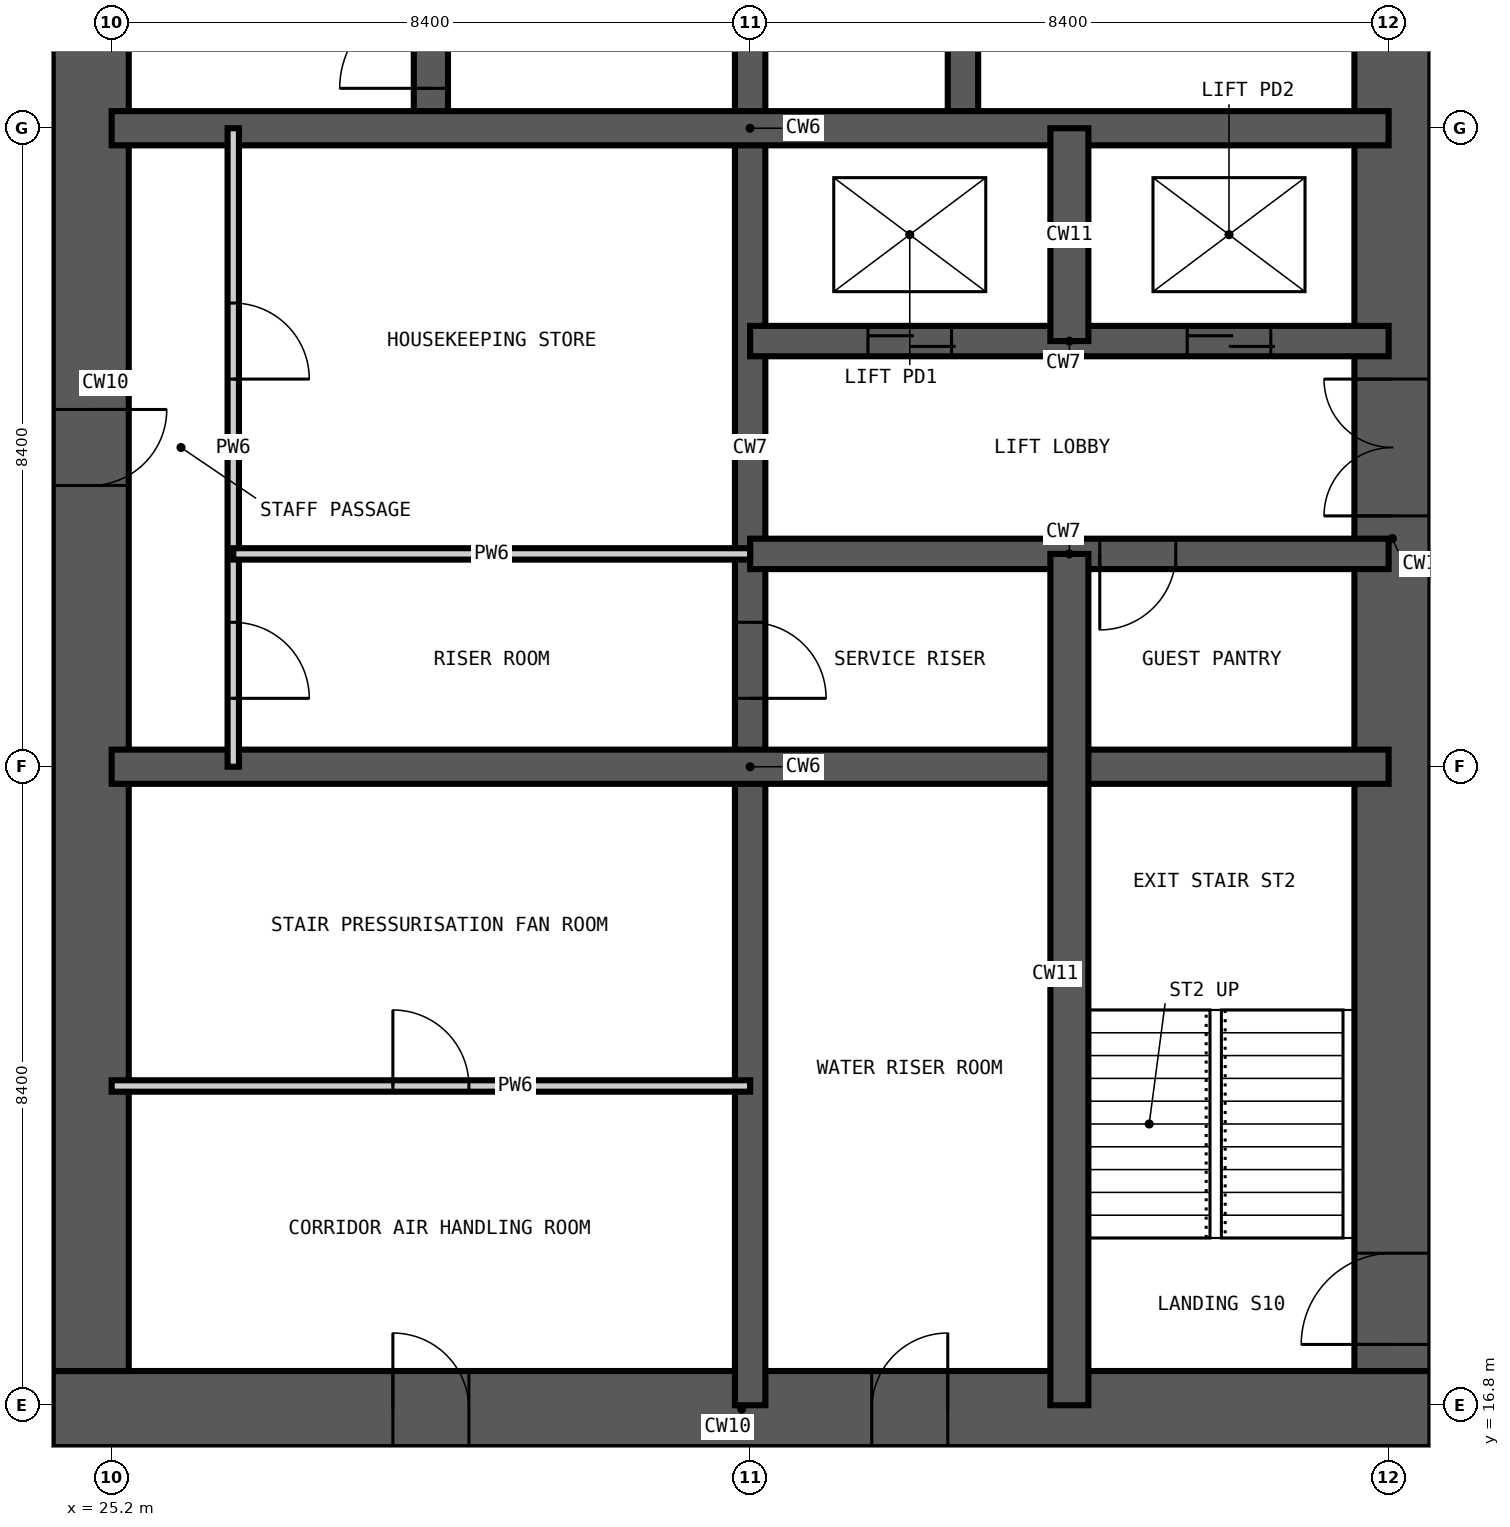
"""IFC4 building model, lengths in metres.
Left out: names, types, materials, properties, quantities, classifications, styles, units other than length and angle.
Written with IfcOpenShell. Run it as: python <this file> out.ifc"""

import sys

from ifc_helpers import new_model, si_unit, direction, frame, frame_2d, origin, place, context, subcontext, project, spatial, rectangle, extrude, element, fill, save


model = new_model("IFC4")
c1 = context("Model", 3, precision=1e-05, world=origin(), true_north=direction((0.0, 1.0)))
c2 = subcontext(c1, "Body", "Model", "MODEL_VIEW")
j1 = project(units=[si_unit("LENGTHUNIT", "METRE"), si_unit("PLANEANGLEUNIT", "RADIAN")], contexts=[c1])
p1 = place(None, origin())
s1 = spatial("IfcSite", under=j1, at=p1, CompositionType="ELEMENT")
p2 = place(p1, origin())
s2 = spatial("IfcBuilding", under=s1, at=p2, CompositionType="ELEMENT")
p3 = place(p2, frame((0.0, 0.0, 225.6)))
s3 = spatial("IfcBuildingStorey", under=s2, at=p3, CompositionType="ELEMENT", Elevation=225.6)
p4 = place(p3, frame((24.425, 16.75, -0.35), z_axis=(0.0, 0.0, 1.0), x_axis=(1.0, 0.0, 0.0)))
e1 = element("IfcWall", 1, at=p4, inside=s3, PredefinedType="SHEAR", context=c2, shape_type="SweptSolid", body=[
    extrude(rectangle(XDim=18.125, YDim=1.0, at=frame_2d((9.062, 0.0))), origin(), (0.0, 0.0, 1.0), 3.9),
])
p5 = place(p4, frame((4.475, 0.0, 0.35)))
e2 = element("IfcOpeningElement", 2, at=p5, cuts=e1, PredefinedType="OPENING", context=c2, shape_type="SweptSolid", body=[
    extrude(rectangle(XDim=1.0, YDim=2.1, at=frame_2d((0.5, 1.05))), frame((0.0, 0.51, 0.0), z_axis=(0.0, -1.0, 0.0), x_axis=(1.0, 0.0, 0.0)), (0.0, 0.0, 1.0), 1.02),
])
p6 = place(p4, frame((10.775, 0.0, 0.35)))
e3 = element("IfcOpeningElement", 3, at=p6, cuts=e1, PredefinedType="OPENING", context=c2, shape_type="SweptSolid", body=[
    extrude(rectangle(XDim=1.0, YDim=2.1, at=frame_2d((0.5, 1.05))), frame((0.0, 0.51, 0.0), z_axis=(0.0, -1.0, 0.0), x_axis=(1.0, 0.0, 0.0)), (0.0, 0.0, 1.0), 1.02),
])
p7 = place(p3, frame((42.05, 17.25, -0.35), z_axis=(0.0, 0.0, 1.0), x_axis=(0.0, 1.0, 0.0)))
e4 = element("IfcWall", 4, at=p7, inside=s3, PredefinedType="SHEAR", context=c2, shape_type="SweptSolid", body=[
    extrude(rectangle(XDim=24.3, YDim=1.0, at=frame_2d((12.15, 0.0))), origin(), (0.0, 0.0, 1.0), 3.9),
])
p8 = place(p7, frame((0.35, 0.0, 0.35)))
e5 = element("IfcOpeningElement", 5, at=p8, cuts=e4, PredefinedType="OPENING", context=c2, shape_type="SweptSolid", body=[
    extrude(rectangle(XDim=1.2, YDim=2.2, at=frame_2d((0.6, 1.1))), frame((0.0, 0.51, 0.0), z_axis=(0.0, -1.0, 0.0), x_axis=(1.0, 0.0, 0.0)), (0.0, 0.0, 1.0), 1.02),
])
p9 = place(p7, frame((11.25, 0.0, 0.35)))
e6 = element("IfcOpeningElement", 6, at=p9, cuts=e4, PredefinedType="OPENING", context=c2, shape_type="SweptSolid", body=[
    extrude(rectangle(XDim=1.8, YDim=2.2, at=frame_2d((0.9, 1.1))), frame((0.0, 0.51, 0.0), z_axis=(0.0, -1.0, 0.0), x_axis=(1.0, 0.0, 0.0)), (0.0, 0.0, 1.0), 1.02),
])
p10 = place(p7, frame((20.05, 0.0, 0.35)))
e7 = element("IfcOpeningElement", 7, at=p10, cuts=e4, PredefinedType="OPENING", context=c2, shape_type="SweptSolid", body=[
    extrude(rectangle(XDim=1.0, YDim=2.1, at=frame_2d((0.5, 1.05))), frame((0.0, 0.51, 0.0), z_axis=(0.0, -1.0, 0.0), x_axis=(1.0, 0.0, 0.0)), (0.0, 0.0, 1.0), 1.02),
])
p11 = place(p3, frame((24.925, 41.55, -0.35), z_axis=(0.0, 0.0, 1.0), x_axis=(0.0, -1.0, 0.0)))
e8 = element("IfcWall", 8, at=p11, inside=s3, PredefinedType="SHEAR", context=c2, shape_type="SweptSolid", body=[
    extrude(rectangle(XDim=24.3, YDim=1.0, at=frame_2d((12.15, 0.0))), origin(), (0.0, 0.0, 1.0), 3.9),
])
p12 = place(p11, frame((11.65, 0.0, 0.35)))
e9 = element("IfcOpeningElement", 9, at=p12, cuts=e8, PredefinedType="OPENING", context=c2, shape_type="SweptSolid", body=[
    extrude(rectangle(XDim=1.0, YDim=2.1, at=frame_2d((0.5, 1.05))), frame((0.0, 0.51, 0.0), z_axis=(0.0, -1.0, 0.0), x_axis=(1.0, 0.0, 0.0)), (0.0, 0.0, 1.0), 1.02),
])
p13 = place(p3, frame((33.6, 16.8, -0.35), z_axis=(0.0, 0.0, 1.0), x_axis=(0.0, 1.0, 0.0)))
e10 = element("IfcWall", 10, at=p13, inside=s3, PredefinedType="SHEAR", context=c2, shape_type="SweptSolid", body=[
    extrude(rectangle(XDim=25.2, YDim=0.4, at=frame_2d((12.6, 0.0))), origin(), (0.0, 0.0, 1.0), 3.9),
])
p14 = place(p13, frame((22.5, 0.0, 0.35)))
e11 = element("IfcOpeningElement", 11, at=p14, cuts=e10, PredefinedType="OPENING", context=c2, shape_type="SweptSolid", body=[
    extrude(rectangle(XDim=1.2, YDim=2.2, at=frame_2d((0.6, 1.1))), frame((0.0, 0.21, 0.0), z_axis=(0.0, -1.0, 0.0), x_axis=(1.0, 0.0, 0.0)), (0.0, 0.0, 1.0), 0.42),
])
p15 = place(p13, frame((18.3, 0.0, 0.35)))
e12 = element("IfcOpeningElement", 12, at=p15, cuts=e10, PredefinedType="OPENING", context=c2, shape_type="SweptSolid", body=[
    extrude(rectangle(XDim=1.2, YDim=2.2, at=frame_2d((0.6, 1.1))), frame((0.0, 0.21, 0.0), z_axis=(0.0, -1.0, 0.0), x_axis=(1.0, 0.0, 0.0)), (0.0, 0.0, 1.0), 0.42),
])
p16 = place(p13, frame((9.3, 0.0, 0.35)))
e13 = element("IfcOpeningElement", 13, at=p16, cuts=e10, PredefinedType="OPENING", context=c2, shape_type="SweptSolid", body=[
    extrude(rectangle(XDim=1.0, YDim=2.1, at=frame_2d((0.5, 1.05))), frame((0.0, 0.21, 0.0), z_axis=(0.0, -1.0, 0.0), x_axis=(1.0, 0.0, 0.0)), (0.0, 0.0, 1.0), 0.42),
])
p17 = place(p3, frame((36.4, 33.6, -0.35), z_axis=(0.0, 0.0, 1.0), x_axis=(0.0, 1.0, 0.0)))
e14 = element("IfcWall", 14, at=p17, inside=s3, PredefinedType="SHEAR", context=c2, shape_type="SweptSolid", body=[
    extrude(rectangle(XDim=8.4, YDim=0.4, at=frame_2d((4.2, 0.0))), origin(), (0.0, 0.0, 1.0), 3.9),
])
p18 = place(p3, frame((33.6, 28.0, -0.35), z_axis=(0.0, 0.0, 1.0), x_axis=(1.0, 0.0, 0.0)))
e15 = element("IfcWall", 15, at=p18, inside=s3, PredefinedType="SHEAR", context=c2, shape_type="SweptSolid", body=[
    extrude(rectangle(XDim=8.4, YDim=0.4, at=frame_2d((4.2, 0.0))), origin(), (0.0, 0.0, 1.0), 3.9),
])
p19 = place(p18, frame((4.6, 0.0, 0.35)))
e16 = element("IfcOpeningElement", 16, at=p19, cuts=e15, PredefinedType="OPENING", context=c2, shape_type="SweptSolid", body=[
    extrude(rectangle(XDim=1.0, YDim=2.1, at=frame_2d((0.5, 1.05))), frame((0.0, 0.21, 0.0), z_axis=(0.0, -1.0, 0.0), x_axis=(1.0, 0.0, 0.0)), (0.0, 0.0, 1.0), 0.42),
])
p20 = place(p3, frame((33.6, 30.8, -0.35), z_axis=(0.0, 0.0, 1.0), x_axis=(1.0, 0.0, 0.0)))
e17 = element("IfcWall", 17, at=p20, inside=s3, PredefinedType="SHEAR", context=c2, shape_type="SweptSolid", body=[
    extrude(rectangle(XDim=8.4, YDim=0.4, at=frame_2d((4.2, 0.0))), origin(), (0.0, 0.0, 1.0), 3.9),
])
p21 = place(p20, frame((1.55, 0.0, 0.35)))
e18 = element("IfcOpeningElement", 18, at=p21, cuts=e17, PredefinedType="OPENING", context=c2, shape_type="SweptSolid", body=[
    extrude(rectangle(XDim=1.1, YDim=2.2, at=frame_2d((0.55, 1.1))), frame((0.0, 0.21, 0.0), z_axis=(0.0, -1.0, 0.0), x_axis=(1.0, 0.0, 0.0)), (0.0, 0.0, 1.0), 0.42),
])
p22 = place(p20, frame((5.75, 0.0, 0.35)))
e19 = element("IfcOpeningElement", 19, at=p22, cuts=e17, PredefinedType="OPENING", context=c2, shape_type="SweptSolid", body=[
    extrude(rectangle(XDim=1.1, YDim=2.2, at=frame_2d((0.55, 1.1))), frame((0.0, 0.21, 0.0), z_axis=(0.0, -1.0, 0.0), x_axis=(1.0, 0.0, 0.0)), (0.0, 0.0, 1.0), 0.42),
])
p23 = place(p3, frame((29.4, 33.6, -0.35), z_axis=(0.0, 0.0, 1.0), x_axis=(0.0, 1.0, 0.0)))
e20 = element("IfcWall", 20, at=p23, inside=s3, PredefinedType="SHEAR", context=c2, shape_type="SweptSolid", body=[
    extrude(rectangle(XDim=8.4, YDim=0.45, at=frame_2d((4.2, 0.0))), origin(), (0.0, 0.0, 1.0), 3.9),
])
p24 = place(p23, frame((0.525, 0.0, 0.35)))
e21 = element("IfcOpeningElement", 21, at=p24, cuts=e20, PredefinedType="OPENING", context=c2, shape_type="SweptSolid", body=[
    extrude(rectangle(XDim=1.2, YDim=2.2, at=frame_2d((0.6, 1.1))), frame((0.0, 0.235, 0.0), z_axis=(0.0, -1.0, 0.0), x_axis=(1.0, 0.0, 0.0)), (0.0, 0.0, 1.0), 0.47),
])
for number, where, z_axis, x_axis in (
    (22, (25.2, 25.2, -0.35), (0.0, 0.0, 1.0), (1.0, 0.0, 0.0)),
    (23, (25.2, 33.6, -0.35), (0.0, 0.0, 1.0), (1.0, 0.0, 0.0)),
):
    element("IfcWall", number, at=place(p3, frame(where, z_axis=z_axis, x_axis=x_axis)), inside=s3, PredefinedType="SHEAR", context=c2, shape_type="SweptSolid", body=[
        extrude(rectangle(XDim=16.8, YDim=0.45, at=frame_2d((8.4, 0.0))), origin(), (0.0, 0.0, 1.0), 3.9),
    ])
p25 = place(p3, frame((37.8, 16.8, -0.35), z_axis=(0.0, 0.0, 1.0), x_axis=(0.0, 1.0, 0.0)))
e24 = element("IfcWall", 24, at=p25, inside=s3, PredefinedType="SHEAR", context=c2, shape_type="SweptSolid", body=[
    extrude(rectangle(XDim=11.2, YDim=0.5, at=frame_2d((5.6, 0.0))), origin(), (0.0, 0.0, 1.0), 3.9),
])
p26 = place(p3, frame((37.8, 30.8, -0.35), z_axis=(0.0, 0.0, 1.0), x_axis=(0.0, 1.0, 0.0)))
e25 = element("IfcWall", 25, at=p26, inside=s3, PredefinedType="SHEAR", context=c2, shape_type="SweptSolid", body=[
    extrude(rectangle(XDim=2.8, YDim=0.5, at=frame_2d((1.4, 0.0))), origin(), (0.0, 0.0, 1.0), 3.9),
])
p27 = place(p3, frame((26.8, 25.2, 0.0), z_axis=(0.0, 0.0, 1.0), x_axis=(0.0, 1.0, 0.0)))
e26 = element("IfcWall", 26, at=p27, inside=s3, PredefinedType="PARTITIONING", context=c2, shape_type="SweptSolid", body=[
    extrude(rectangle(XDim=8.4, YDim=0.15, at=frame_2d((4.2, 0.0))), origin(), (0.0, 0.0, 1.0), 3.55),
])
p28 = place(p27, frame((0.9, 0.0, 0.0)))
e27 = element("IfcOpeningElement", 27, at=p28, cuts=e26, PredefinedType="OPENING", context=c2, shape_type="SweptSolid", body=[
    extrude(rectangle(XDim=1.0, YDim=2.1, at=frame_2d((0.5, 1.05))), frame((0.0, 0.085, 0.0), z_axis=(0.0, -1.0, 0.0), x_axis=(1.0, 0.0, 0.0)), (0.0, 0.0, 1.0), 0.17),
])
p29 = place(p27, frame((5.1, 0.0, 0.0)))
e28 = element("IfcOpeningElement", 28, at=p29, cuts=e26, PredefinedType="OPENING", context=c2, shape_type="SweptSolid", body=[
    extrude(rectangle(XDim=1.0, YDim=2.1, at=frame_2d((0.5, 1.05))), frame((0.0, 0.085, 0.0), z_axis=(0.0, -1.0, 0.0), x_axis=(1.0, 0.0, 0.0)), (0.0, 0.0, 1.0), 0.17),
])
p30 = place(p3, frame((25.2, 21.0, 0.0), z_axis=(0.0, 0.0, 1.0), x_axis=(1.0, 0.0, 0.0)))
e29 = element("IfcWall", 29, at=p30, inside=s3, PredefinedType="PARTITIONING", context=c2, shape_type="SweptSolid", body=[
    extrude(rectangle(XDim=8.4, YDim=0.15, at=frame_2d((4.2, 0.0))), origin(), (0.0, 0.0, 1.0), 3.55),
])
p31 = place(p30, frame((3.7, 0.0, 0.0)))
e30 = element("IfcOpeningElement", 30, at=p31, cuts=e29, PredefinedType="OPENING", context=c2, shape_type="SweptSolid", body=[
    extrude(rectangle(XDim=1.0, YDim=2.1, at=frame_2d((0.5, 1.05))), frame((0.0, 0.085, 0.0), z_axis=(0.0, -1.0, 0.0), x_axis=(1.0, 0.0, 0.0)), (0.0, 0.0, 1.0), 0.17),
])
p32 = place(p3, frame((26.8, 28.0, 0.0), z_axis=(0.0, 0.0, 1.0), x_axis=(1.0, 0.0, 0.0)))
e31 = element("IfcWall", 31, at=p32, inside=s3, PredefinedType="PARTITIONING", context=c2, shape_type="SweptSolid", body=[
    extrude(rectangle(XDim=6.8, YDim=0.15, at=frame_2d((3.4, 0.0))), origin(), (0.0, 0.0, 1.0), 3.55),
])
p33 = place(p24, origin())
e32 = element("IfcDoor", 32, at=p33, inside=s3, OperationType="SINGLE_SWING_LEFT", PredefinedType="DOOR", context=c2, shape_type="SweptSolid", body=[
    extrude(rectangle(XDim=1.2, YDim=2.2, at=frame_2d((0.6, 1.1))), frame((0.0, 0.025, 0.0), z_axis=(0.0, -1.0, 0.0), x_axis=(1.0, 0.0, 0.0)), (0.0, 0.0, 1.0), 0.05),
])
fill(e21, e32)
p34 = place(p8, origin())
e33 = element("IfcDoor", 33, at=p34, inside=s3, OperationType="SINGLE_SWING_LEFT", PredefinedType="DOOR", context=c2, shape_type="SweptSolid", body=[
    extrude(rectangle(XDim=1.2, YDim=2.2, at=frame_2d((0.6, 1.1))), frame((0.0, 0.025, 0.0), z_axis=(0.0, -1.0, 0.0), x_axis=(1.0, 0.0, 0.0)), (0.0, 0.0, 1.0), 0.05),
])
fill(e5, e33)
p35 = place(p21, origin())
e34 = element("IfcDoor", 34, at=p35, inside=s3, OperationType="DOUBLE_DOOR_SLIDING", PredefinedType="DOOR", context=c2, shape_type="SweptSolid", body=[
    extrude(rectangle(XDim=1.1, YDim=2.2, at=frame_2d((0.55, 1.1))), frame((0.0, 0.025, 0.0), z_axis=(0.0, -1.0, 0.0), x_axis=(1.0, 0.0, 0.0)), (0.0, 0.0, 1.0), 0.05),
])
fill(e18, e34)
p36 = place(p22, origin())
e35 = element("IfcDoor", 35, at=p36, inside=s3, OperationType="DOUBLE_DOOR_SLIDING", PredefinedType="DOOR", context=c2, shape_type="SweptSolid", body=[
    extrude(rectangle(XDim=1.1, YDim=2.2, at=frame_2d((0.55, 1.1))), frame((0.0, 0.025, 0.0), z_axis=(0.0, -1.0, 0.0), x_axis=(1.0, 0.0, 0.0)), (0.0, 0.0, 1.0), 0.05),
])
fill(e19, e35)
p37 = place(p12, origin())
e36 = element("IfcDoor", 36, at=p37, inside=s3, OperationType="SINGLE_SWING_LEFT", PredefinedType="DOOR", context=c2, shape_type="SweptSolid", body=[
    extrude(rectangle(XDim=1.0, YDim=2.1, at=frame_2d((0.5, 1.05))), frame((0.0, 0.025, 0.0), z_axis=(0.0, -1.0, 0.0), x_axis=(1.0, 0.0, 0.0)), (0.0, 0.0, 1.0), 0.05),
])
fill(e9, e36)
p38 = place(p28, frame((1.0, 0.0, 0.0), z_axis=(0.0, 0.0, 1.0), x_axis=(-1.0, 0.0, 0.0)))
e37 = element("IfcDoor", 37, at=p38, inside=s3, OperationType="SINGLE_SWING_RIGHT", PredefinedType="DOOR", context=c2, shape_type="SweptSolid", body=[
    extrude(rectangle(XDim=1.0, YDim=2.1, at=frame_2d((0.5, 1.05))), frame((0.0, 0.025, 0.0), z_axis=(0.0, -1.0, 0.0), x_axis=(1.0, 0.0, 0.0)), (0.0, 0.0, 1.0), 0.05),
])
fill(e27, e37)
p39 = place(p29, frame((1.0, 0.0, 0.0), z_axis=(0.0, 0.0, 1.0), x_axis=(-1.0, 0.0, 0.0)))
e38 = element("IfcDoor", 38, at=p39, inside=s3, OperationType="SINGLE_SWING_RIGHT", PredefinedType="DOOR", context=c2, shape_type="SweptSolid", body=[
    extrude(rectangle(XDim=1.0, YDim=2.1, at=frame_2d((0.5, 1.05))), frame((0.0, 0.025, 0.0), z_axis=(0.0, -1.0, 0.0), x_axis=(1.0, 0.0, 0.0)), (0.0, 0.0, 1.0), 0.05),
])
fill(e28, e38)
p40 = place(p16, frame((1.0, 0.0, 0.0), z_axis=(0.0, 0.0, 1.0), x_axis=(-1.0, 0.0, 0.0)))
e39 = element("IfcDoor", 39, at=p40, inside=s3, OperationType="SINGLE_SWING_RIGHT", PredefinedType="DOOR", context=c2, shape_type="SweptSolid", body=[
    extrude(rectangle(XDim=1.0, YDim=2.1, at=frame_2d((0.5, 1.05))), frame((0.0, 0.025, 0.0), z_axis=(0.0, -1.0, 0.0), x_axis=(1.0, 0.0, 0.0)), (0.0, 0.0, 1.0), 0.05),
])
fill(e13, e39)
p41 = place(p19, frame((1.0, 0.0, 0.0), z_axis=(0.0, 0.0, 1.0), x_axis=(-1.0, 0.0, 0.0)))
e40 = element("IfcDoor", 40, at=p41, inside=s3, OperationType="SINGLE_SWING_RIGHT", PredefinedType="DOOR", context=c2, shape_type="SweptSolid", body=[
    extrude(rectangle(XDim=1.0, YDim=2.1, at=frame_2d((0.5, 1.05))), frame((0.0, 0.025, 0.0), z_axis=(0.0, -1.0, 0.0), x_axis=(1.0, 0.0, 0.0)), (0.0, 0.0, 1.0), 0.05),
])
fill(e16, e40)
p42 = place(p9, origin())
e41 = element("IfcDoor", 41, at=p42, inside=s3, OperationType="DOUBLE_DOOR_DOUBLE_SWING", PredefinedType="DOOR", context=c2, shape_type="SweptSolid", body=[
    extrude(rectangle(XDim=1.8, YDim=2.2, at=frame_2d((0.9, 1.1))), frame((0.0, 0.025, 0.0), z_axis=(0.0, -1.0, 0.0), x_axis=(1.0, 0.0, 0.0)), (0.0, 0.0, 1.0), 0.05),
])
fill(e6, e41)
p43 = place(p5, origin())
e42 = element("IfcDoor", 42, at=p43, inside=s3, OperationType="SINGLE_SWING_LEFT", PredefinedType="DOOR", context=c2, shape_type="SweptSolid", body=[
    extrude(rectangle(XDim=1.0, YDim=2.1, at=frame_2d((0.5, 1.05))), frame((0.0, 0.025, 0.0), z_axis=(0.0, -1.0, 0.0), x_axis=(1.0, 0.0, 0.0)), (0.0, 0.0, 1.0), 0.05),
])
fill(e2, e42)
p44 = place(p31, origin())
e43 = element("IfcDoor", 43, at=p44, inside=s3, OperationType="SINGLE_SWING_LEFT", PredefinedType="DOOR", context=c2, shape_type="SweptSolid", body=[
    extrude(rectangle(XDim=1.0, YDim=2.1, at=frame_2d((0.5, 1.05))), frame((0.0, 0.025, 0.0), z_axis=(0.0, -1.0, 0.0), x_axis=(1.0, 0.0, 0.0)), (0.0, 0.0, 1.0), 0.05),
])
fill(e30, e43)
p45 = place(p6, origin())
e44 = element("IfcDoor", 44, at=p45, inside=s3, OperationType="SINGLE_SWING_RIGHT", PredefinedType="DOOR", context=c2, shape_type="SweptSolid", body=[
    extrude(rectangle(XDim=1.0, YDim=2.1, at=frame_2d((0.5, 1.05))), frame((0.0, 0.025, 0.0), z_axis=(0.0, -1.0, 0.0), x_axis=(1.0, 0.0, 0.0)), (0.0, 0.0, 1.0), 0.05),
])
fill(e3, e44)
save(model, sys.argv[1])
